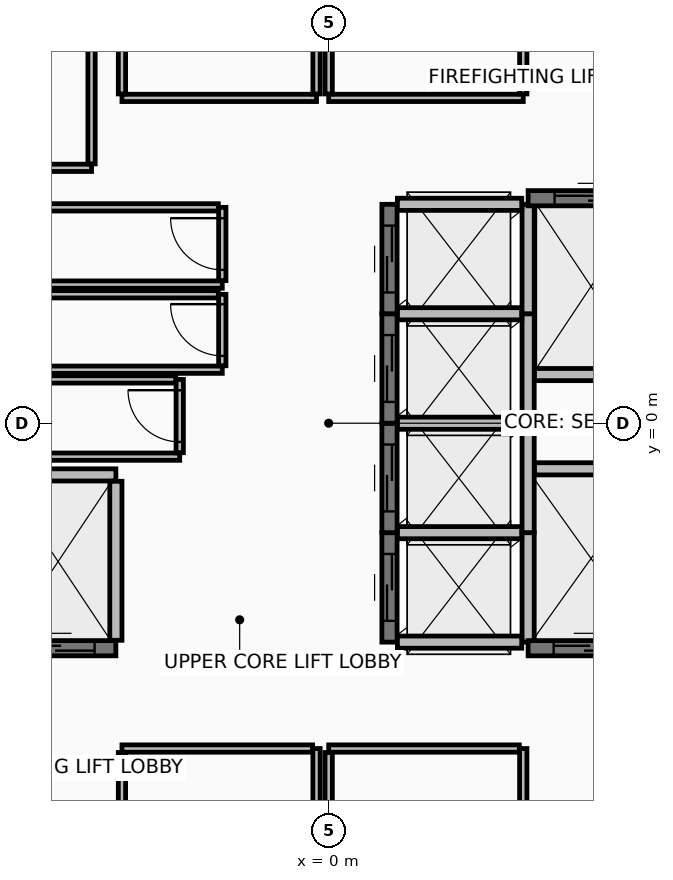
"""IFC4 building model, lengths in metres.
Left out: names, types, materials, properties, quantities, classifications, styles, units other than length and angle.
Written with IfcOpenShell. Run it as: python <this file> out.ifc"""

import sys

from ifc_helpers import new_model, si_unit, direction, frame, frame_2d, origin, place, context, subcontext, project, spatial, rectangle, extrude, element, fill, save


model = new_model("IFC4")
c1 = context("Model", 3, precision=1e-05, world=origin(), true_north=direction((0.0, 1.0)))
c2 = subcontext(c1, "Body", "Model", "MODEL_VIEW")
j1 = project(units=[si_unit("LENGTHUNIT", "METRE"), si_unit("PLANEANGLEUNIT", "RADIAN")], contexts=[c1])
p1 = place(None, origin())
s1 = spatial("IfcSite", under=j1, at=p1, CompositionType="ELEMENT")
p2 = place(p1, origin())
s2 = spatial("IfcBuilding", under=s1, at=p2, CompositionType="ELEMENT")
p3 = place(p2, frame((0.0, 0.0, 287.05)))
s3 = spatial("IfcBuildingStorey", under=s2, at=p3, CompositionType="ELEMENT", Elevation=287.05)
p4 = place(p3, frame((1.0, -3.6, 0.0), z_axis=(0.0, 0.0, 1.0), x_axis=(0.0, 1.0, 0.0)))
e1 = element("IfcWall", 1, at=p4, inside=s3, PredefinedType="SHEAR", context=c2, shape_type="SweptSolid", body=[
    extrude(rectangle(XDim=1.8, YDim=0.25, at=frame_2d((0.9, 0.0))), origin(), (0.0, 0.0, 1.0), 3.465),
])
p5 = place(p4, frame((0.35, 0.0, 0.0)))
e2 = element("IfcOpeningElement", 2, at=p5, cuts=e1, PredefinedType="OPENING", context=c2, shape_type="SweptSolid", body=[
    extrude(rectangle(XDim=1.1, YDim=2.2, at=frame_2d((0.55, 1.1))), frame((0.0, 0.135, 0.0), z_axis=(0.0, -1.0, 0.0), x_axis=(1.0, 0.0, 0.0)), (0.0, 0.0, 1.0), 0.27),
])
p6 = place(p3, frame((3.28, -3.6, 0.0), z_axis=(0.0, 0.0, 1.0), x_axis=(0.0, 1.0, 0.0)))
e3 = element("IfcWall", 3, at=p6, inside=s3, PredefinedType="PARTITIONING", context=c2, shape_type="SweptSolid", body=[
    extrude(rectangle(XDim=1.8, YDim=0.2, at=frame_2d((0.9, 0.0))), origin(), (0.0, 0.0, 1.0), 3.465),
])
for number, where, z_axis, x_axis in (
    (4, (1.13, -3.6, 0.0), (0.0, 0.0, 1.0), (1.0, 0.0, 0.0)),
    (5, (1.13, -1.8, 0.0), (0.0, 0.0, 1.0), (1.0, 0.0, 0.0)),
):
    element("IfcWall", number, at=place(p3, frame(where, z_axis=z_axis, x_axis=x_axis)), inside=s3, PredefinedType="PARTITIONING", context=c2, shape_type="SweptSolid", body=[
        extrude(rectangle(XDim=2.045, YDim=0.2, at=frame_2d((1.022, 0.0))), origin(), (0.0, 0.0, 1.0), 3.465),
    ])
p7 = place(p3, frame((1.0, -1.8, 0.0), z_axis=(0.0, 0.0, 1.0), x_axis=(0.0, 1.0, 0.0)))
e6 = element("IfcWall", 6, at=p7, inside=s3, PredefinedType="SHEAR", context=c2, shape_type="SweptSolid", body=[
    extrude(rectangle(XDim=1.8, YDim=0.25, at=frame_2d((0.9, 0.0))), origin(), (0.0, 0.0, 1.0), 3.465),
])
p8 = place(p7, frame((0.35, 0.0, 0.0)))
e7 = element("IfcOpeningElement", 7, at=p8, cuts=e6, PredefinedType="OPENING", context=c2, shape_type="SweptSolid", body=[
    extrude(rectangle(XDim=1.1, YDim=2.2, at=frame_2d((0.55, 1.1))), frame((0.0, 0.135, 0.0), z_axis=(0.0, -1.0, 0.0), x_axis=(1.0, 0.0, 0.0)), (0.0, 0.0, 1.0), 0.27),
])
p9 = place(p3, frame((3.28, -1.8, 0.0), z_axis=(0.0, 0.0, 1.0), x_axis=(0.0, 1.0, 0.0)))
e8 = element("IfcWall", 8, at=p9, inside=s3, PredefinedType="PARTITIONING", context=c2, shape_type="SweptSolid", body=[
    extrude(rectangle(XDim=1.8, YDim=0.2, at=frame_2d((0.9, 0.0))), origin(), (0.0, 0.0, 1.0), 3.465),
])
p10 = place(p3, frame((1.13, 0.0, 0.0), z_axis=(0.0, 0.0, 1.0), x_axis=(1.0, 0.0, 0.0)))
e9 = element("IfcWall", 9, at=p10, inside=s3, PredefinedType="PARTITIONING", context=c2, shape_type="SweptSolid", body=[
    extrude(rectangle(XDim=2.045, YDim=0.2, at=frame_2d((1.022, 0.0))), origin(), (0.0, 0.0, 1.0), 3.465),
])
p11 = place(p3, frame((1.0, 0.0, 0.0), z_axis=(0.0, 0.0, 1.0), x_axis=(0.0, 1.0, 0.0)))
e10 = element("IfcWall", 10, at=p11, inside=s3, PredefinedType="SHEAR", context=c2, shape_type="SweptSolid", body=[
    extrude(rectangle(XDim=1.8, YDim=0.25, at=frame_2d((0.9, 0.0))), origin(), (0.0, 0.0, 1.0), 3.465),
])
p12 = place(p11, frame((0.35, 0.0, 0.0)))
e11 = element("IfcOpeningElement", 11, at=p12, cuts=e10, PredefinedType="OPENING", context=c2, shape_type="SweptSolid", body=[
    extrude(rectangle(XDim=1.1, YDim=2.2, at=frame_2d((0.55, 1.1))), frame((0.0, 0.135, 0.0), z_axis=(0.0, -1.0, 0.0), x_axis=(1.0, 0.0, 0.0)), (0.0, 0.0, 1.0), 0.27),
])
p13 = place(p3, frame((3.28, 0.0, 0.0), z_axis=(0.0, 0.0, 1.0), x_axis=(0.0, 1.0, 0.0)))
e12 = element("IfcWall", 12, at=p13, inside=s3, PredefinedType="PARTITIONING", context=c2, shape_type="SweptSolid", body=[
    extrude(rectangle(XDim=1.8, YDim=0.2, at=frame_2d((0.9, 0.0))), origin(), (0.0, 0.0, 1.0), 3.465),
])
p14 = place(p3, frame((1.13, 1.8, 0.0), z_axis=(0.0, 0.0, 1.0), x_axis=(1.0, 0.0, 0.0)))
e13 = element("IfcWall", 13, at=p14, inside=s3, PredefinedType="PARTITIONING", context=c2, shape_type="SweptSolid", body=[
    extrude(rectangle(XDim=2.045, YDim=0.2, at=frame_2d((1.022, 0.0))), origin(), (0.0, 0.0, 1.0), 3.465),
])
p15 = place(p3, frame((1.0, 1.8, 0.0), z_axis=(0.0, 0.0, 1.0), x_axis=(0.0, 1.0, 0.0)))
e14 = element("IfcWall", 14, at=p15, inside=s3, PredefinedType="SHEAR", context=c2, shape_type="SweptSolid", body=[
    extrude(rectangle(XDim=1.8, YDim=0.25, at=frame_2d((0.9, 0.0))), origin(), (0.0, 0.0, 1.0), 3.465),
])
p16 = place(p15, frame((0.35, 0.0, 0.0)))
e15 = element("IfcOpeningElement", 15, at=p16, cuts=e14, PredefinedType="OPENING", context=c2, shape_type="SweptSolid", body=[
    extrude(rectangle(XDim=1.1, YDim=2.2, at=frame_2d((0.55, 1.1))), frame((0.0, 0.135, 0.0), z_axis=(0.0, -1.0, 0.0), x_axis=(1.0, 0.0, 0.0)), (0.0, 0.0, 1.0), 0.27),
])
p17 = place(p3, frame((3.28, 1.8, 0.0), z_axis=(0.0, 0.0, 1.0), x_axis=(0.0, 1.0, 0.0)))
e16 = element("IfcWall", 16, at=p17, inside=s3, PredefinedType="PARTITIONING", context=c2, shape_type="SweptSolid", body=[
    extrude(rectangle(XDim=1.8, YDim=0.2, at=frame_2d((0.9, 0.0))), origin(), (0.0, 0.0, 1.0), 3.465),
])
p18 = place(p3, frame((1.13, 3.6, 0.0), z_axis=(0.0, 0.0, 1.0), x_axis=(1.0, 0.0, 0.0)))
e17 = element("IfcWall", 17, at=p18, inside=s3, PredefinedType="PARTITIONING", context=c2, shape_type="SweptSolid", body=[
    extrude(rectangle(XDim=2.045, YDim=0.2, at=frame_2d((1.022, 0.0))), origin(), (0.0, 0.0, 1.0), 2.76),
])
p19 = place(p3, frame((-5.4, -3.7, 0.0), z_axis=(0.0, 0.0, 1.0), x_axis=(1.0, 0.0, 0.0)))
e18 = element("IfcWall", 18, at=p19, inside=s3, PredefinedType="SHEAR", context=c2, shape_type="SweptSolid", body=[
    extrude(rectangle(XDim=1.9, YDim=0.25, at=frame_2d((0.95, 0.0))), origin(), (0.0, 0.0, 1.0), 3.465),
])
p20 = place(p19, frame((0.35, 0.0, 0.0)))
e19 = element("IfcOpeningElement", 19, at=p20, cuts=e18, PredefinedType="OPENING", context=c2, shape_type="SweptSolid", body=[
    extrude(rectangle(XDim=1.2, YDim=2.2, at=frame_2d((0.6, 1.1))), frame((0.0, 0.135, 0.0), z_axis=(0.0, -1.0, 0.0), x_axis=(1.0, 0.0, 0.0)), (0.0, 0.0, 1.0), 0.27),
])
p21 = place(p3, frame((-5.27, -0.85, 0.0), z_axis=(0.0, 0.0, 1.0), x_axis=(1.0, 0.0, 0.0)))
e20 = element("IfcWall", 20, at=p21, inside=s3, PredefinedType="PARTITIONING", context=c2, shape_type="SweptSolid", body=[
    extrude(rectangle(XDim=1.77, YDim=0.2, at=frame_2d((0.885, 0.0))), origin(), (0.0, 0.0, 1.0), 3.465),
])
p22 = place(p3, frame((-3.5, -3.57, 0.0), z_axis=(0.0, 0.0, 1.0), x_axis=(0.0, 1.0, 0.0)))
e21 = element("IfcWall", 21, at=p22, inside=s3, PredefinedType="PARTITIONING", context=c2, shape_type="SweptSolid", body=[
    extrude(rectangle(XDim=2.615, YDim=0.2, at=frame_2d((1.308, 0.0))), origin(), (0.0, 0.0, 1.0), 3.465),
])
p23 = place(p3, frame((3.28, 3.7, 0.0), z_axis=(0.0, 0.0, 1.0), x_axis=(1.0, 0.0, 0.0)))
e22 = element("IfcWall", 22, at=p23, inside=s3, PredefinedType="SHEAR", context=c2, shape_type="SweptSolid", body=[
    extrude(rectangle(XDim=2.07, YDim=0.25, at=frame_2d((1.035, 0.0))), origin(), (0.0, 0.0, 1.0), 3.465),
])
p24 = place(p23, frame((0.435, 0.0, 0.0)))
e23 = element("IfcOpeningElement", 23, at=p24, cuts=e22, PredefinedType="OPENING", context=c2, shape_type="SweptSolid", body=[
    extrude(rectangle(XDim=1.2, YDim=2.2, at=frame_2d((0.6, 1.1))), frame((0.0, 0.135, 0.0), z_axis=(0.0, -1.0, 0.0), x_axis=(1.0, 0.0, 0.0)), (0.0, 0.0, 1.0), 0.27),
])
p25 = place(p3, frame((3.385, 0.8, 0.0), z_axis=(0.0, 0.0, 1.0), x_axis=(1.0, 0.0, 0.0)))
e24 = element("IfcWall", 24, at=p25, inside=s3, PredefinedType="PARTITIONING", context=c2, shape_type="SweptSolid", body=[
    extrude(rectangle(XDim=1.835, YDim=0.2, at=frame_2d((0.917, 0.0))), origin(), (0.0, 0.0, 1.0), 3.465),
])
p26 = place(p3, frame((3.28, -3.7, 0.0), z_axis=(0.0, 0.0, 1.0), x_axis=(1.0, 0.0, 0.0)))
e25 = element("IfcWall", 25, at=p26, inside=s3, PredefinedType="SHEAR", context=c2, shape_type="SweptSolid", body=[
    extrude(rectangle(XDim=1.94, YDim=0.25, at=frame_2d((0.97, 0.0))), origin(), (0.0, 0.0, 1.0), 3.465),
])
p27 = place(p26, frame((0.42, 0.0, 0.0)))
e26 = element("IfcOpeningElement", 26, at=p27, cuts=e25, PredefinedType="OPENING", context=c2, shape_type="SweptSolid", body=[
    extrude(rectangle(XDim=1.1, YDim=2.2, at=frame_2d((0.55, 1.1))), frame((0.0, 0.135, 0.0), z_axis=(0.0, -1.0, 0.0), x_axis=(1.0, 0.0, 0.0)), (0.0, 0.0, 1.0), 0.27),
])
p28 = place(p3, frame((3.385, -0.75, 0.0), z_axis=(0.0, 0.0, 1.0), x_axis=(1.0, 0.0, 0.0)))
e27 = element("IfcWall", 27, at=p28, inside=s3, PredefinedType="PARTITIONING", context=c2, shape_type="SweptSolid", body=[
    extrude(rectangle(XDim=1.835, YDim=0.2, at=frame_2d((0.917, 0.0))), origin(), (0.0, 0.0, 1.0), 3.465),
])
p29 = place(p3, frame((-5.22, 2.28, 0.0), z_axis=(0.0, 0.0, 1.0), x_axis=(1.0, 0.0, 0.0)))
e28 = element("IfcWall", 28, at=p29, inside=s3, PredefinedType="PARTITIONING", context=c2, shape_type="SweptSolid", body=[
    extrude(rectangle(XDim=3.47, YDim=0.12, at=frame_2d((1.735, 0.0))), origin(), (0.0, 0.0, 1.0), 3.465),
])
p30 = place(p3, frame((-1.75, 2.345, 0.0), z_axis=(0.0, 0.0, 1.0), x_axis=(0.0, 1.0, 0.0)))
e29 = element("IfcWall", 29, at=p30, inside=s3, PredefinedType="PARTITIONING", context=c2, shape_type="SweptSolid", body=[
    extrude(rectangle(XDim=1.205, YDim=0.12, at=frame_2d((0.603, 0.0))), origin(), (0.0, 0.0, 1.0), 3.465),
])
p31 = place(p30, frame((0.177, 0.0, 0.0)))
e30 = element("IfcOpeningElement", 30, at=p31, cuts=e29, PredefinedType="OPENING", context=c2, shape_type="SweptSolid", body=[
    extrude(rectangle(XDim=0.85, YDim=2.1, at=frame_2d((0.425, 1.05))), frame((0.0, 0.07, 0.0), z_axis=(0.0, -1.0, 0.0), x_axis=(1.0, 0.0, 0.0)), (0.0, 0.0, 1.0), 0.14),
])
p32 = place(p3, frame((-1.815, 3.55, 0.0), z_axis=(0.0, 0.0, 1.0), x_axis=(-1.0, 0.0, 0.0)))
e31 = element("IfcWall", 31, at=p32, inside=s3, PredefinedType="PARTITIONING", context=c2, shape_type="SweptSolid", body=[
    extrude(rectangle(XDim=3.405, YDim=0.12, at=frame_2d((1.703, 0.0))), origin(), (0.0, 0.0, 1.0), 3.465),
])
p33 = place(p3, frame((-5.22, 0.88, 0.0), z_axis=(0.0, 0.0, 1.0), x_axis=(1.0, 0.0, 0.0)))
e32 = element("IfcWall", 32, at=p33, inside=s3, PredefinedType="PARTITIONING", context=c2, shape_type="SweptSolid", body=[
    extrude(rectangle(XDim=3.47, YDim=0.12, at=frame_2d((1.735, 0.0))), origin(), (0.0, 0.0, 1.0), 3.465),
])
p34 = place(p3, frame((-1.75, 0.945, 0.0), z_axis=(0.0, 0.0, 1.0), x_axis=(0.0, 1.0, 0.0)))
e33 = element("IfcWall", 33, at=p34, inside=s3, PredefinedType="PARTITIONING", context=c2, shape_type="SweptSolid", body=[
    extrude(rectangle(XDim=1.175, YDim=0.12, at=frame_2d((0.587, 0.0))), origin(), (0.0, 0.0, 1.0), 3.465),
])
p35 = place(p34, frame((0.163, 0.0, 0.0)))
e34 = element("IfcOpeningElement", 34, at=p35, cuts=e33, PredefinedType="OPENING", context=c2, shape_type="SweptSolid", body=[
    extrude(rectangle(XDim=0.85, YDim=2.1, at=frame_2d((0.425, 1.05))), frame((0.0, 0.07, 0.0), z_axis=(0.0, -1.0, 0.0), x_axis=(1.0, 0.0, 0.0)), (0.0, 0.0, 1.0), 0.14),
])
p36 = place(p3, frame((-1.815, 2.12, 0.0), z_axis=(0.0, 0.0, 1.0), x_axis=(-1.0, 0.0, 0.0)))
e35 = element("IfcWall", 35, at=p36, inside=s3, PredefinedType="PARTITIONING", context=c2, shape_type="SweptSolid", body=[
    extrude(rectangle(XDim=3.405, YDim=0.12, at=frame_2d((1.703, 0.0))), origin(), (0.0, 0.0, 1.0), 3.465),
])
p37 = place(p3, frame((-5.22, -0.55, 0.0), z_axis=(0.0, 0.0, 1.0), x_axis=(1.0, 0.0, 0.0)))
e36 = element("IfcWall", 36, at=p37, inside=s3, PredefinedType="PARTITIONING", context=c2, shape_type="SweptSolid", body=[
    extrude(rectangle(XDim=2.77, YDim=0.12, at=frame_2d((1.385, 0.0))), origin(), (0.0, 0.0, 1.0), 3.465),
])
p38 = place(p3, frame((-2.45, -0.485, 0.0), z_axis=(0.0, 0.0, 1.0), x_axis=(0.0, 1.0, 0.0)))
e37 = element("IfcWall", 37, at=p38, inside=s3, PredefinedType="PARTITIONING", context=c2, shape_type="SweptSolid", body=[
    extrude(rectangle(XDim=1.205, YDim=0.12, at=frame_2d((0.603, 0.0))), origin(), (0.0, 0.0, 1.0), 3.465),
])
p39 = place(p38, frame((0.178, 0.0, 0.0)))
e38 = element("IfcOpeningElement", 38, at=p39, cuts=e37, PredefinedType="OPENING", context=c2, shape_type="SweptSolid", body=[
    extrude(rectangle(XDim=0.85, YDim=2.1, at=frame_2d((0.425, 1.05))), frame((0.0, 0.07, 0.0), z_axis=(0.0, -1.0, 0.0), x_axis=(1.0, 0.0, 0.0)), (0.0, 0.0, 1.0), 0.14),
])
p40 = place(p3, frame((-2.515, 0.72, 0.0), z_axis=(0.0, 0.0, 1.0), x_axis=(-1.0, 0.0, 0.0)))
e39 = element("IfcWall", 39, at=p40, inside=s3, PredefinedType="PARTITIONING", context=c2, shape_type="SweptSolid", body=[
    extrude(rectangle(XDim=2.705, YDim=0.12, at=frame_2d((1.353, 0.0))), origin(), (0.0, 0.0, 1.0), 3.465),
])
p41 = place(p3, frame((-0.2, -7.42, 0.0), z_axis=(0.0, 0.0, 1.0), x_axis=(0.0, 1.0, 0.0)))
e40 = element("IfcWall", 40, at=p41, inside=s3, PredefinedType="PARTITIONING", context=c2, shape_type="SweptSolid", body=[
    extrude(rectangle(XDim=2.07, YDim=0.12, at=frame_2d((1.035, 0.0))), origin(), (0.0, 0.0, 1.0), 2.76),
])
p42 = place(p3, frame((-0.265, -5.35, 0.0), z_axis=(0.0, 0.0, 1.0), x_axis=(-1.0, 0.0, 0.0)))
e41 = element("IfcWall", 41, at=p42, inside=s3, PredefinedType="PARTITIONING", context=c2, shape_type="SweptSolid", body=[
    extrude(rectangle(XDim=3.135, YDim=0.12, at=frame_2d((1.567, 0.0))), origin(), (0.0, 0.0, 1.0), 2.76),
])
p43 = place(p3, frame((-3.4, -5.415, 0.0), z_axis=(0.0, 0.0, 1.0), x_axis=(0.0, -1.0, 0.0)))
e42 = element("IfcWall", 42, at=p43, inside=s3, PredefinedType="PARTITIONING", context=c2, shape_type="SweptSolid", body=[
    extrude(rectangle(XDim=2.8, YDim=0.12, at=frame_2d((1.4, 0.0))), origin(), (0.0, 0.0, 1.0), 2.76),
])
p44 = place(p3, frame((3.2, -8.215, 0.0), z_axis=(0.0, 0.0, 1.0), x_axis=(0.0, 1.0, 0.0)))
e43 = element("IfcWall", 43, at=p44, inside=s3, PredefinedType="PARTITIONING", context=c2, shape_type="SweptSolid", body=[
    extrude(rectangle(XDim=2.865, YDim=0.12, at=frame_2d((1.433, 0.0))), origin(), (0.0, 0.0, 1.0), 2.76),
])
p45 = place(p3, frame((3.135, -5.35, 0.0), z_axis=(0.0, 0.0, 1.0), x_axis=(-1.0, 0.0, 0.0)))
e44 = element("IfcWall", 44, at=p45, inside=s3, PredefinedType="PARTITIONING", context=c2, shape_type="SweptSolid", body=[
    extrude(rectangle(XDim=3.135, YDim=0.12, at=frame_2d((1.567, 0.0))), origin(), (0.0, 0.0, 1.0), 3.465),
])
p46 = place(p3, frame((0.0, -5.415, 0.0), z_axis=(0.0, 0.0, 1.0), x_axis=(0.0, -1.0, 0.0)))
e45 = element("IfcWall", 45, at=p46, inside=s3, PredefinedType="PARTITIONING", context=c2, shape_type="SweptSolid", body=[
    extrude(rectangle(XDim=2.005, YDim=0.12, at=frame_2d((1.002, 0.0))), origin(), (0.0, 0.0, 1.0), 2.76),
])
p47 = place(p3, frame((-3.4, 5.35, 0.0), z_axis=(0.0, 0.0, 1.0), x_axis=(1.0, 0.0, 0.0)))
e46 = element("IfcWall", 46, at=p47, inside=s3, PredefinedType="PARTITIONING", context=c2, shape_type="SweptSolid", body=[
    extrude(rectangle(XDim=3.2, YDim=0.12, at=frame_2d((1.6, 0.0))), origin(), (0.0, 0.0, 1.0), 3.465),
])
p48 = place(p3, frame((-0.2, 5.415, 0.0), z_axis=(0.0, 0.0, 1.0), x_axis=(0.0, 1.0, 0.0)))
e47 = element("IfcWall", 47, at=p48, inside=s3, PredefinedType="PARTITIONING", context=c2, shape_type="SweptSolid", body=[
    extrude(rectangle(XDim=2.005, YDim=0.12, at=frame_2d((1.002, 0.0))), origin(), (0.0, 0.0, 1.0), 2.76),
])
p49 = place(p3, frame((-3.4, 8.215, 0.0), z_axis=(0.0, 0.0, 1.0), x_axis=(0.0, -1.0, 0.0)))
e48 = element("IfcWall", 48, at=p49, inside=s3, PredefinedType="PARTITIONING", context=c2, shape_type="SweptSolid", body=[
    extrude(rectangle(XDim=2.8, YDim=0.12, at=frame_2d((1.4, 0.0))), origin(), (0.0, 0.0, 1.0), 2.76),
])
p50 = place(p3, frame((0.0, 5.35, 0.0), z_axis=(0.0, 0.0, 1.0), x_axis=(1.0, 0.0, 0.0)))
e49 = element("IfcWall", 49, at=p50, inside=s3, PredefinedType="PARTITIONING", context=c2, shape_type="SweptSolid", body=[
    extrude(rectangle(XDim=3.2, YDim=0.12, at=frame_2d((1.6, 0.0))), origin(), (0.0, 0.0, 1.0), 2.76),
])
p51 = place(p3, frame((3.2, 5.415, 0.0), z_axis=(0.0, 0.0, 1.0), x_axis=(0.0, 1.0, 0.0)))
e50 = element("IfcWall", 50, at=p51, inside=s3, PredefinedType="PARTITIONING", context=c2, shape_type="SweptSolid", body=[
    extrude(rectangle(XDim=2.8, YDim=0.12, at=frame_2d((1.4, 0.0))), origin(), (0.0, 0.0, 1.0), 2.76),
])
p52 = place(p3, frame((0.0, 7.42, 0.0), z_axis=(0.0, 0.0, 1.0), x_axis=(0.0, -1.0, 0.0)))
e51 = element("IfcWall", 51, at=p52, inside=s3, PredefinedType="PARTITIONING", context=c2, shape_type="SweptSolid", body=[
    extrude(rectangle(XDim=2.005, YDim=0.12, at=frame_2d((1.002, 0.0))), origin(), (0.0, 0.0, 1.0), 2.76),
])
p53 = place(p3, frame((-7.8, 4.2, 0.0), z_axis=(0.0, 0.0, 1.0), x_axis=(1.0, 0.0, 0.0)))
e52 = element("IfcWall", 52, at=p53, inside=s3, PredefinedType="PARTITIONING", context=c2, shape_type="SweptSolid", body=[
    extrude(rectangle(XDim=3.9, YDim=0.12, at=frame_2d((1.95, 0.0))), origin(), (0.0, 0.0, 1.0), 3.465),
])
p54 = place(p3, frame((-3.9, 4.265, 0.0), z_axis=(0.0, 0.0, 1.0), x_axis=(0.0, 1.0, 0.0)))
e53 = element("IfcWall", 53, at=p54, inside=s3, PredefinedType="PARTITIONING", context=c2, shape_type="SweptSolid", body=[
    extrude(rectangle(XDim=3.95, YDim=0.12, at=frame_2d((1.975, 0.0))), origin(), (0.0, 0.0, 1.0), 2.76),
])
p55 = place(p5, origin())
e54 = element("IfcDoor", 54, at=p55, inside=s3, OperationType="SLIDING_TO_LEFT", PredefinedType="DOOR", context=c2, shape_type="SweptSolid", body=[
    extrude(rectangle(XDim=1.1, YDim=2.2, at=frame_2d((0.55, 1.1))), frame((0.0, 0.025, 0.0), z_axis=(0.0, -1.0, 0.0), x_axis=(1.0, 0.0, 0.0)), (0.0, 0.0, 1.0), 0.05),
])
fill(e2, e54)
p56 = place(p8, origin())
e55 = element("IfcDoor", 55, at=p56, inside=s3, OperationType="SLIDING_TO_LEFT", PredefinedType="DOOR", context=c2, shape_type="SweptSolid", body=[
    extrude(rectangle(XDim=1.1, YDim=2.2, at=frame_2d((0.55, 1.1))), frame((0.0, 0.025, 0.0), z_axis=(0.0, -1.0, 0.0), x_axis=(1.0, 0.0, 0.0)), (0.0, 0.0, 1.0), 0.05),
])
fill(e7, e55)
p57 = place(p12, origin())
e56 = element("IfcDoor", 56, at=p57, inside=s3, OperationType="SLIDING_TO_LEFT", PredefinedType="DOOR", context=c2, shape_type="SweptSolid", body=[
    extrude(rectangle(XDim=1.1, YDim=2.2, at=frame_2d((0.55, 1.1))), frame((0.0, 0.025, 0.0), z_axis=(0.0, -1.0, 0.0), x_axis=(1.0, 0.0, 0.0)), (0.0, 0.0, 1.0), 0.05),
])
fill(e11, e56)
p58 = place(p16, origin())
e57 = element("IfcDoor", 57, at=p58, inside=s3, OperationType="SLIDING_TO_LEFT", PredefinedType="DOOR", context=c2, shape_type="SweptSolid", body=[
    extrude(rectangle(XDim=1.1, YDim=2.2, at=frame_2d((0.55, 1.1))), frame((0.0, 0.025, 0.0), z_axis=(0.0, -1.0, 0.0), x_axis=(1.0, 0.0, 0.0)), (0.0, 0.0, 1.0), 0.05),
])
fill(e15, e57)
p59 = place(p20, origin())
e58 = element("IfcDoor", 58, at=p59, inside=s3, OperationType="SLIDING_TO_RIGHT", PredefinedType="DOOR", context=c2, shape_type="SweptSolid", body=[
    extrude(rectangle(XDim=1.2, YDim=2.2, at=frame_2d((0.6, 1.1))), frame((0.0, 0.025, 0.0), z_axis=(0.0, -1.0, 0.0), x_axis=(1.0, 0.0, 0.0)), (0.0, 0.0, 1.0), 0.05),
])
fill(e19, e58)
p60 = place(p24, origin())
e59 = element("IfcDoor", 59, at=p60, inside=s3, OperationType="SLIDING_TO_RIGHT", PredefinedType="DOOR", context=c2, shape_type="SweptSolid", body=[
    extrude(rectangle(XDim=1.2, YDim=2.2, at=frame_2d((0.6, 1.1))), frame((0.0, 0.025, 0.0), z_axis=(0.0, -1.0, 0.0), x_axis=(1.0, 0.0, 0.0)), (0.0, 0.0, 1.0), 0.05),
])
fill(e23, e59)
p61 = place(p27, origin())
e60 = element("IfcDoor", 60, at=p61, inside=s3, OperationType="SLIDING_TO_LEFT", PredefinedType="DOOR", context=c2, shape_type="SweptSolid", body=[
    extrude(rectangle(XDim=1.1, YDim=2.2, at=frame_2d((0.55, 1.1))), frame((0.0, 0.025, 0.0), z_axis=(0.0, -1.0, 0.0), x_axis=(1.0, 0.0, 0.0)), (0.0, 0.0, 1.0), 0.05),
])
fill(e26, e60)
p62 = place(p31, frame((0.85, 0.0, 0.0), z_axis=(0.0, 0.0, 1.0), x_axis=(-1.0, 0.0, 0.0)))
e61 = element("IfcDoor", 61, at=p62, inside=s3, OperationType="SINGLE_SWING_RIGHT", PredefinedType="DOOR", context=c2, shape_type="SweptSolid", body=[
    extrude(rectangle(XDim=0.85, YDim=2.1, at=frame_2d((0.425, 1.05))), frame((0.0, 0.025, 0.0), z_axis=(0.0, -1.0, 0.0), x_axis=(1.0, 0.0, 0.0)), (0.0, 0.0, 1.0), 0.05),
])
fill(e30, e61)
p63 = place(p35, frame((0.85, 0.0, 0.0), z_axis=(0.0, 0.0, 1.0), x_axis=(-1.0, 0.0, 0.0)))
e62 = element("IfcDoor", 62, at=p63, inside=s3, OperationType="SINGLE_SWING_RIGHT", PredefinedType="DOOR", context=c2, shape_type="SweptSolid", body=[
    extrude(rectangle(XDim=0.85, YDim=2.1, at=frame_2d((0.425, 1.05))), frame((0.0, 0.025, 0.0), z_axis=(0.0, -1.0, 0.0), x_axis=(1.0, 0.0, 0.0)), (0.0, 0.0, 1.0), 0.05),
])
fill(e34, e62)
p64 = place(p39, frame((0.85, 0.0, 0.0), z_axis=(0.0, 0.0, 1.0), x_axis=(-1.0, 0.0, 0.0)))
e63 = element("IfcDoor", 63, at=p64, inside=s3, OperationType="SINGLE_SWING_RIGHT", PredefinedType="DOOR", context=c2, shape_type="SweptSolid", body=[
    extrude(rectangle(XDim=0.85, YDim=2.1, at=frame_2d((0.425, 1.05))), frame((0.0, 0.025, 0.0), z_axis=(0.0, -1.0, 0.0), x_axis=(1.0, 0.0, 0.0)), (0.0, 0.0, 1.0), 0.05),
])
fill(e38, e63)
save(model, sys.argv[1])
